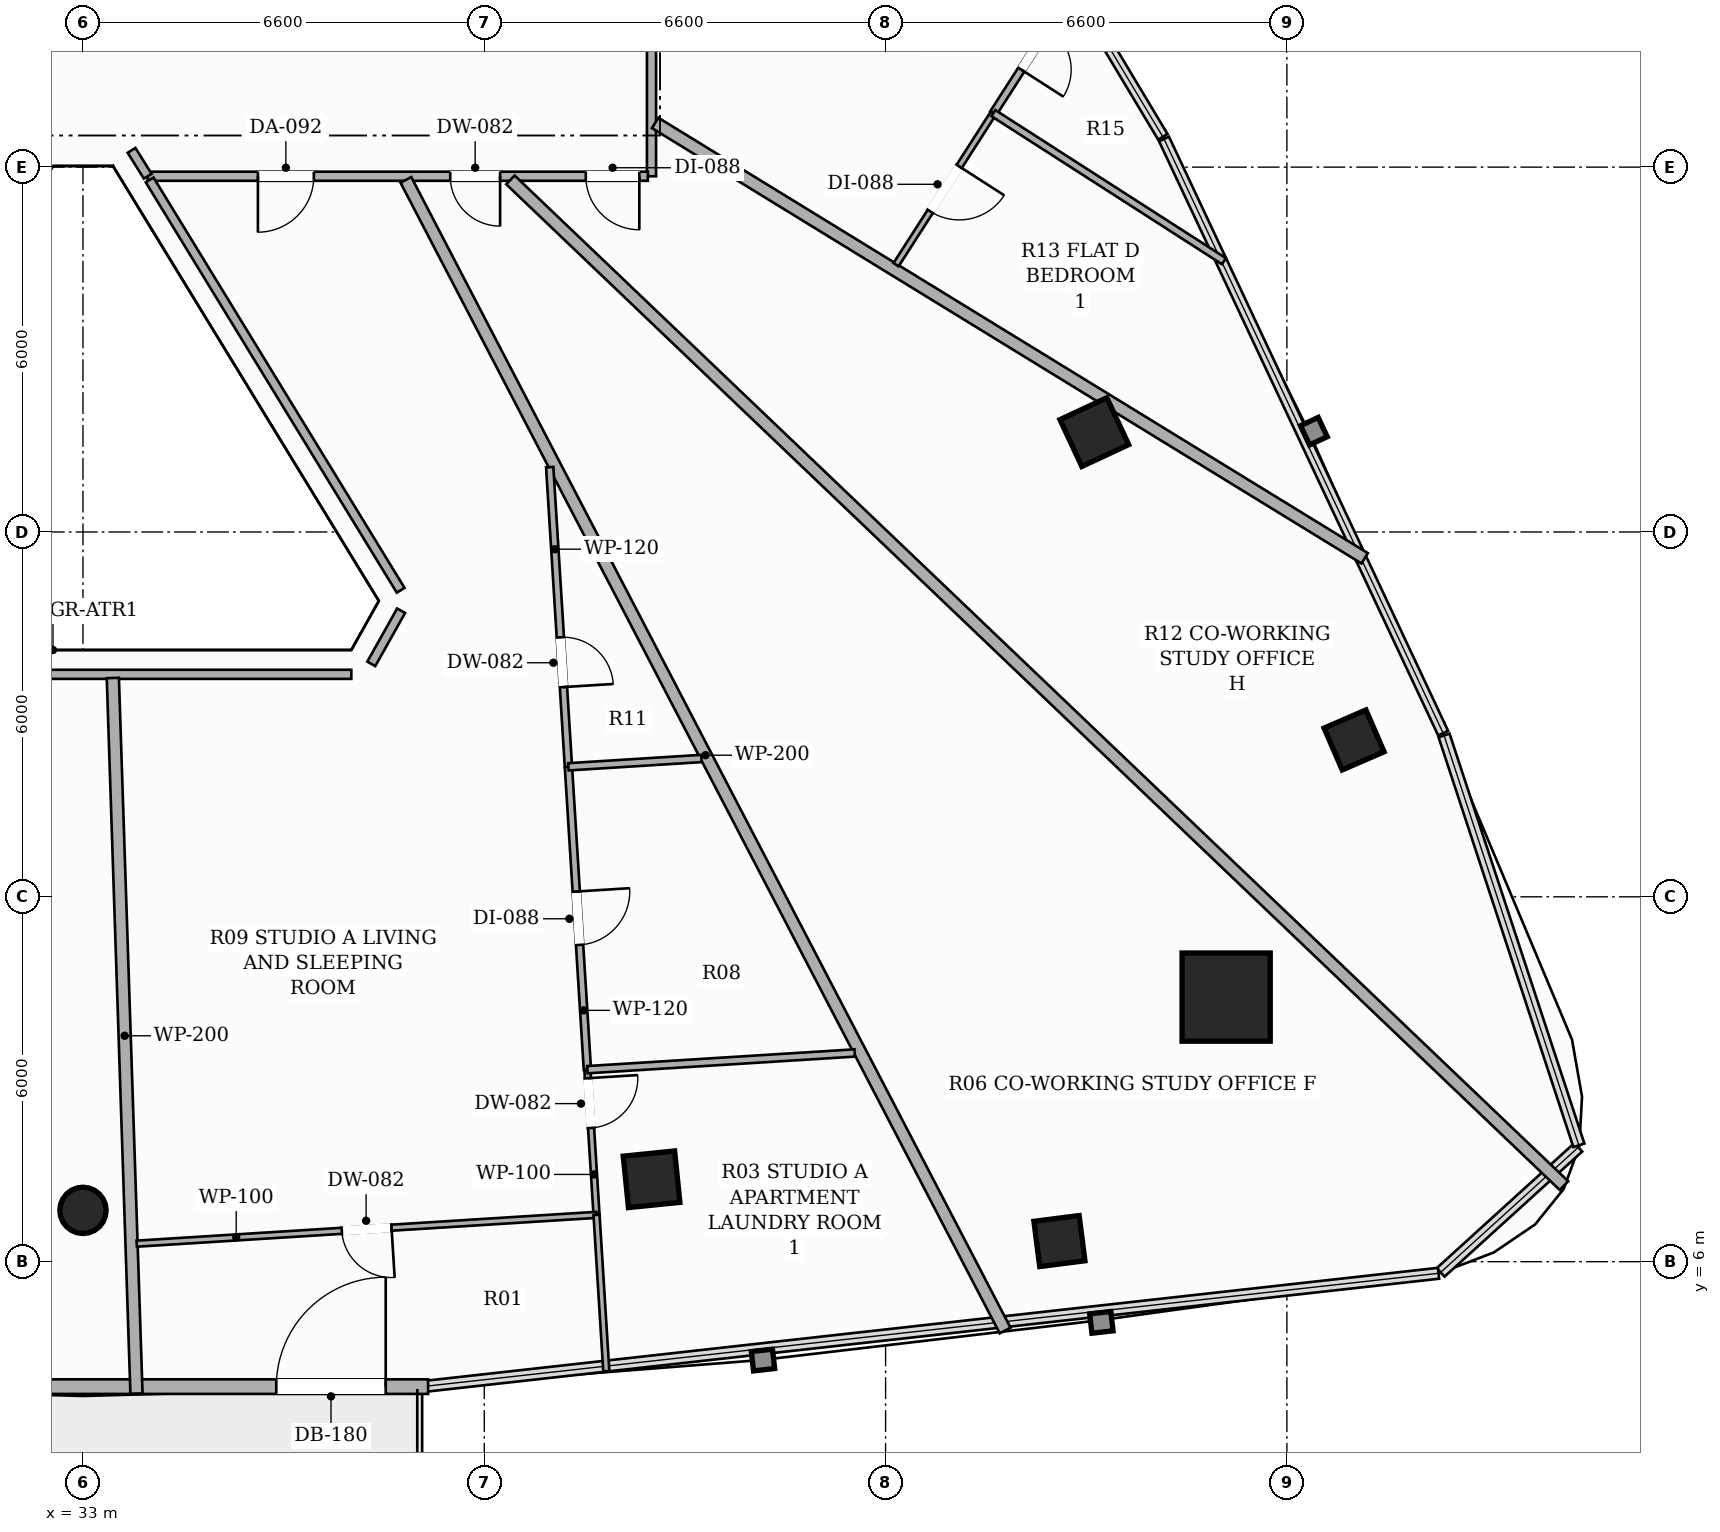
"""IFC4 building model, lengths in metres.
Left out: names, types, materials, properties, quantities, classifications, styles, units other than length and angle.
Written with IfcOpenShell. Run it as: python <this file> out.ifc"""

import sys

from ifc_helpers import new_model, si_unit, direction, frame, frame_2d, origin, origin_2d, place, context, subcontext, project, spatial, rectangle, hollow_rectangle, hollow_circle, extrude, element, fill, save


model = new_model("IFC4")
c1 = context("Model", 3, precision=1e-05, world=origin(), true_north=direction((0.0, 1.0)))
c2 = subcontext(c1, "Body", "Model", "MODEL_VIEW")
j1 = project(units=[si_unit("LENGTHUNIT", "METRE"), si_unit("PLANEANGLEUNIT", "RADIAN")], contexts=[c1])
p1 = place(None, origin())
s1 = spatial("IfcSite", under=j1, at=p1, CompositionType="ELEMENT")
p2 = place(p1, origin())
s2 = spatial("IfcBuilding", under=s1, at=p2, CompositionType="ELEMENT")
p3 = place(p2, frame((0.0, 0.0, 173.75)))
s3 = spatial("IfcBuildingStorey", under=s2, at=p3, CompositionType="ELEMENT", Elevation=173.75)
p4 = place(p3, frame((51.801, 10.351, 0.0), z_axis=(0.0, 0.0, 1.0), x_axis=(1.0, 0.0, 0.0)))
e1 = element("IfcColumn", 1, at=p4, inside=s3, PredefinedType="COLUMN", context=c2, shape_type="SweptSolid", body=[
    extrude(hollow_rectangle(XDim=1.45, YDim=1.45, WallThickness=0.045, at=origin_2d()), origin(), (0.0, 0.0, 1.0), 3.3),
])
p5 = place(p3, frame((33.0, 6.844, 0.0), z_axis=(0.0, 0.0, 1.0), x_axis=(1.0, 0.0, 0.0)))
e2 = element("IfcColumn", 2, at=p5, inside=s3, PredefinedType="COLUMN", context=c2, shape_type="SweptSolid", body=[
    extrude(hollow_circle(Radius=0.381, WallThickness=0.022, at=origin_2d()), origin(), (0.0, 0.0, 1.0), 3.3),
])
for number, where, z_axis, x_axis in (
    (3, (42.351, 7.355, 0.0), (0.0, 0.0, 1.0), (0.995, 0.101, 0.0)),
    (4, (49.633, 19.642, 0.0), (0.0, 0.0, 1.0), (-0.423, 0.906, 0.0)),
):
    element("IfcColumn", number, at=place(p3, frame(where, z_axis=z_axis, x_axis=x_axis)), inside=s3, PredefinedType="COLUMN", context=c2, shape_type="SweptSolid", body=[
        extrude(hollow_rectangle(XDim=0.85, YDim=0.85, WallThickness=0.028, at=origin_2d()), origin(), (0.0, 0.0, 1.0), 3.3),
    ])
for number, where, z_axis, x_axis in (
    (5, (49.059, 6.339, 0.0), (0.0, 0.0, 1.0), (0.992, 0.127, 0.0)),
    (6, (53.905, 14.58, 0.0), (0.0, 0.0, 1.0), (-0.397, 0.918, 0.0)),
):
    element("IfcColumn", number, at=place(p3, frame(where, z_axis=z_axis, x_axis=x_axis)), inside=s3, PredefinedType="COLUMN", context=c2, shape_type="SweptSolid", body=[
        extrude(hollow_rectangle(XDim=0.75, YDim=0.75, WallThickness=0.025, at=origin_2d()), origin(), (0.0, 0.0, 1.0), 3.3),
    ])
p6 = place(p3, frame((27.324, 3.945, 0.0), z_axis=(0.0, 0.0, 1.0), x_axis=(1.0, 0.0, 0.0)))
e7 = element("IfcWall", 7, at=p6, inside=s3, PredefinedType="SOLIDWALL", context=c2, shape_type="SweptSolid", body=[
    extrude(rectangle(XDim=11.352, YDim=0.24, at=frame_2d((5.676, 0.0))), origin(), (0.0, 0.0, 1.0), 2.624),
])
p7 = place(p6, frame((8.855, 0.0, 0.0)))
e8 = element("IfcOpeningElement", 8, at=p7, cuts=e7, PredefinedType="OPENING", context=c2, shape_type="SweptSolid", body=[
    extrude(rectangle(XDim=1.8, YDim=2.2, at=frame_2d((0.9, 1.1))), frame((0.0, 0.13, 0.0), z_axis=(0.0, -1.0, 0.0), x_axis=(1.0, 0.0, 0.0)), (0.0, 0.0, 1.0), 0.26),
])
p8 = place(p3, frame((42.35, 28.34, 0.0), z_axis=(0.0, 0.0, 1.0), x_axis=(0.0, -1.0, 0.0)))
e9 = element("IfcWall", 9, at=p8, inside=s3, PredefinedType="PARTITIONING", context=c2, shape_type="SweptSolid", body=[
    extrude(rectangle(XDim=4.49, YDim=0.15, at=frame_2d((2.245, 0.0))), origin(), (0.0, 0.0, 1.0), 2.721),
])
p9 = place(p8, frame((1.497, 0.0, 0.0)))
e10 = element("IfcOpeningElement", 10, at=p9, cuts=e9, PredefinedType="OPENING", context=c2, shape_type="SweptSolid", body=[
    extrude(rectangle(XDim=0.92, YDim=2.15, at=frame_2d((0.46, 1.075))), frame((0.0, 0.085, 0.0), z_axis=(0.0, -1.0, 0.0), x_axis=(1.0, 0.0, 0.0)), (0.0, 0.0, 1.0), 0.17),
])
p10 = place(p3, frame((42.29, 23.85, 0.0), z_axis=(0.0, 0.0, 1.0), x_axis=(-1.0, 0.0, 0.0)))
e11 = element("IfcWall", 11, at=p10, inside=s3, PredefinedType="PARTITIONING", context=c2, shape_type="SweptSolid", body=[
    extrude(rectangle(XDim=8.225, YDim=0.15, at=frame_2d((4.113, 0.0))), origin(), (0.0, 0.0, 1.0), 2.492),
])
p11 = place(p10, frame((5.493, 0.0, 0.0)))
e12 = element("IfcOpeningElement", 12, at=p11, cuts=e11, PredefinedType="OPENING", context=c2, shape_type="SweptSolid", body=[
    extrude(rectangle(XDim=0.92, YDim=2.15, at=frame_2d((0.46, 1.075))), frame((0.0, 0.085, 0.0), z_axis=(0.0, -1.0, 0.0), x_axis=(1.0, 0.0, 0.0)), (0.0, 0.0, 1.0), 0.17),
])
p12 = place(p10, frame((2.43, 0.0, 0.0)))
e13 = element("IfcOpeningElement", 13, at=p12, cuts=e11, PredefinedType="OPENING", context=c2, shape_type="SweptSolid", body=[
    extrude(rectangle(XDim=0.82, YDim=2.1, at=frame_2d((0.41, 1.05))), frame((0.0, 0.085, 0.0), z_axis=(0.0, -1.0, 0.0), x_axis=(1.0, 0.0, 0.0)), (0.0, 0.0, 1.0), 0.17),
])
p13 = place(p10, frame((0.14, 0.0, 0.0)))
e14 = element("IfcOpeningElement", 14, at=p13, cuts=e11, PredefinedType="OPENING", context=c2, shape_type="SweptSolid", body=[
    extrude(rectangle(XDim=0.88, YDim=2.1, at=frame_2d((0.44, 1.05))), frame((0.0, 0.085, 0.0), z_axis=(0.0, -1.0, 0.0), x_axis=(1.0, 0.0, 0.0)), (0.0, 0.0, 1.0), 0.17),
])
p14 = place(p3, frame((34.065, 23.85, 0.0), z_axis=(0.0, 0.0, 1.0), x_axis=(-0.529649150849, 0.84821682193, 0.0)))
e15 = element("IfcWall", 15, at=p14, inside=s3, PredefinedType="PARTITIONING", context=c2, shape_type="SweptSolid", body=[
    extrude(rectangle(XDim=0.502, YDim=0.15, at=frame_2d((0.251, 0.0))), origin(), (0.0, 0.0, 1.0), 3.06),
])
p15 = place(p3, frame((34.096, 23.79, 0.0), z_axis=(0.0, 0.0, 1.0), x_axis=(0.521886794995, -0.853014755564, 0.0)))
e16 = element("IfcWall", 16, at=p15, inside=s3, PredefinedType="PARTITIONING", context=c2, shape_type="SweptSolid", body=[
    extrude(rectangle(XDim=7.912, YDim=0.15, at=frame_2d((3.956, 0.0))), origin(), (0.0, 0.0, 1.0), 2.721),
])
p16 = place(p3, frame((38.232, 16.705, 0.0), z_axis=(0.0, 0.0, 1.0), x_axis=(-0.489011382175, -0.872277403183, 0.0)))
e17 = element("IfcWall", 17, at=p16, inside=s3, PredefinedType="PARTITIONING", context=c2, shape_type="SweptSolid", body=[
    extrude(rectangle(XDim=1.002, YDim=0.15, at=frame_2d((0.501, 0.0))), origin(), (0.0, 0.0, 1.0), 3.06),
])
p17 = place(p3, frame((37.413, 15.659, 0.0), z_axis=(0.0, 0.0, 1.0), x_axis=(-1.0, 0.0, 0.0)))
e18 = element("IfcWall", 18, at=p17, inside=s3, PredefinedType="PARTITIONING", context=c2, shape_type="SweptSolid", body=[
    extrude(rectangle(XDim=8.826, YDim=0.15, at=frame_2d((4.413, 0.0))), origin(), (0.0, 0.0, 1.0), 2.721),
])
p18 = place(p3, frame((33.88, 3.831, 0.0), z_axis=(0.0, 0.0, 1.0), x_axis=(-0.033030388285, 0.999454347857, 0.0)))
e19 = element("IfcWall", 19, at=p18, inside=s3, PredefinedType="PARTITIONING", context=c2, shape_type="SweptSolid", body=[
    extrude(rectangle(XDim=11.774, YDim=0.2, at=frame_2d((5.887, 0.0))), origin(), (0.0, 0.0, 1.0), 2.413),
])
p19 = place(p3, frame((38.311, 23.79, 0.0), z_axis=(0.0, 0.0, 1.0), x_axis=(0.461923729454, -0.886919651472, 0.0)))
e20 = element("IfcWall", 20, at=p19, inside=s3, PredefinedType="PARTITIONING", context=c2, shape_type="SweptSolid", body=[
    extrude(rectangle(XDim=21.335, YDim=0.2, at=frame_2d((10.667, 0.0))), origin(), (0.0, 0.0, 1.0), 2.413),
])
p20 = place(p3, frame((54.079, 17.567, 0.0), z_axis=(0.0, 0.0, 1.0), x_axis=(-0.852338446262, 0.5229906051, 0.0)))
e21 = element("IfcWall", 21, at=p20, inside=s3, PredefinedType="PARTITIONING", context=c2, shape_type="SweptSolid", body=[
    extrude(rectangle(XDim=13.691, YDim=0.2, at=frame_2d((6.845, 0.0))), origin(), (0.0, 0.0, 1.0), 2.413),
])
p21 = place(p3, frame((40.03, 23.79, 0.0), z_axis=(0.0, 0.0, 1.0), x_axis=(0.723360866179, -0.690470171174, 0.0)))
e22 = element("IfcWall", 22, at=p21, inside=s3, PredefinedType="PARTITIONING", context=c2, shape_type="SweptSolid", body=[
    extrude(rectangle(XDim=23.953, YDim=0.2, at=frame_2d((11.977, 0.0))), origin(), (0.0, 0.0, 1.0), 2.413),
])
p22 = place(p3, frame((40.676, 19.066, 0.0), z_axis=(0.0, 0.0, 1.0), x_axis=(0.062350581346, -0.998054309647, 0.0)))
e23 = element("IfcWall", 23, at=p22, inside=s3, PredefinedType="PARTITIONING", context=c2, shape_type="SweptSolid", body=[
    extrude(rectangle(XDim=4.938, YDim=0.12, at=frame_2d((2.469, 0.0))), origin(), (0.0, 0.0, 1.0), 2.721),
])
p23 = place(p22, frame((2.804, 0.0, 0.0)))
e24 = element("IfcOpeningElement", 24, at=p23, cuts=e23, PredefinedType="OPENING", context=c2, shape_type="SweptSolid", body=[
    extrude(rectangle(XDim=0.82, YDim=2.1, at=frame_2d((0.41, 1.05))), frame((0.0, 0.07, 0.0), z_axis=(0.0, -1.0, 0.0), x_axis=(1.0, 0.0, 0.0)), (0.0, 0.0, 1.0), 0.14),
])
p24 = place(p3, frame((40.984, 14.138, 0.0), z_axis=(0.0, 0.0, 1.0), x_axis=(0.062518380192, -0.998043812735, 0.0)))
e25 = element("IfcWall", 25, at=p24, inside=s3, PredefinedType="PARTITIONING", context=c2, shape_type="SweptSolid", body=[
    extrude(rectangle(XDim=4.991, YDim=0.12, at=frame_2d((2.495, 0.0))), origin(), (0.0, 0.0, 1.0), 2.721),
])
p25 = place(p24, frame((2.055, 0.0, 0.0)))
e26 = element("IfcOpeningElement", 26, at=p25, cuts=e25, PredefinedType="OPENING", context=c2, shape_type="SweptSolid", body=[
    extrude(rectangle(XDim=0.88, YDim=2.1, at=frame_2d((0.44, 1.05))), frame((0.0, 0.07, 0.0), z_axis=(0.0, -1.0, 0.0), x_axis=(1.0, 0.0, 0.0)), (0.0, 0.0, 1.0), 0.14),
])
p26 = place(p3, frame((41.296, 9.157, 0.0), z_axis=(0.0, 0.0, 1.0), x_axis=(0.062778653683, -0.998027474893, 0.0)))
e27 = element("IfcWall", 27, at=p26, inside=s3, PredefinedType="PARTITIONING", context=c2, shape_type="SweptSolid", body=[
    extrude(rectangle(XDim=2.392, YDim=0.1, at=frame_2d((1.196, 0.0))), origin(), (0.0, 0.0, 1.0), 2.413),
])
p27 = place(p26, frame((0.14, 0.0, 0.0)))
e28 = element("IfcOpeningElement", 28, at=p27, cuts=e27, PredefinedType="OPENING", context=c2, shape_type="SweptSolid", body=[
    extrude(rectangle(XDim=0.82, YDim=2.1, at=frame_2d((0.41, 1.05))), frame((0.0, 0.06, 0.0), z_axis=(0.0, -1.0, 0.0), x_axis=(1.0, 0.0, 0.0)), (0.0, 0.0, 1.0), 0.12),
])
p28 = place(p3, frame((41.446, 6.77, 0.0), z_axis=(0.0, 0.0, 1.0), x_axis=(-0.998040272182, -0.062574875979, 0.0)))
e29 = element("IfcWall", 29, at=p28, inside=s3, PredefinedType="PARTITIONING", context=c2, shape_type="SweptSolid", body=[
    extrude(rectangle(XDim=7.577, YDim=0.1, at=frame_2d((3.789, 0.0))), origin(), (0.0, 0.0, 1.0), 3.06),
])
p29 = place(p28, frame((3.378, 0.0, 0.0)))
e30 = element("IfcOpeningElement", 30, at=p29, cuts=e29, PredefinedType="OPENING", context=c2, shape_type="SweptSolid", body=[
    extrude(rectangle(XDim=0.82, YDim=2.1, at=frame_2d((0.41, 1.05))), frame((0.0, 0.06, 0.0), z_axis=(0.0, -1.0, 0.0), x_axis=(1.0, 0.0, 0.0)), (0.0, 0.0, 1.0), 0.12),
])
p30 = place(p3, frame((43.171, 14.275, 0.0), z_axis=(0.0, 0.0, 1.0), x_axis=(-0.998044767373, -0.062503138479, 0.0)))
e31 = element("IfcWall", 31, at=p30, inside=s3, PredefinedType="PARTITIONING", context=c2, shape_type="SweptSolid", body=[
    extrude(rectangle(XDim=2.191, YDim=0.12, at=frame_2d((1.096, 0.0))), origin(), (0.0, 0.0, 1.0), 2.721),
])
p31 = place(p3, frame((45.693, 9.432, 0.0), z_axis=(0.0, 0.0, 1.0), x_axis=(-0.998051500251, -0.062395535466, 0.0)))
e32 = element("IfcWall", 32, at=p31, inside=s3, PredefinedType="PARTITIONING", context=c2, shape_type="SweptSolid", body=[
    extrude(rectangle(XDim=4.406, YDim=0.12, at=frame_2d((2.203, 0.0))), origin(), (0.0, 0.0, 1.0), 2.721),
])
p32 = place(p3, frame((41.607, 4.198, 0.0), z_axis=(0.0, 0.0, 1.0), x_axis=(-0.062431368009, 0.99804925945, 0.0)))
e33 = element("IfcWall", 33, at=p32, inside=s3, PredefinedType="PARTITIONING", context=c2, shape_type="SweptSolid", body=[
    extrude(rectangle(XDim=2.577, YDim=0.1, at=frame_2d((1.289, 0.0))), origin(), (0.0, 0.0, 1.0), 3.06),
])
p33 = place(p3, frame((49.335, 27.008, 0.0), z_axis=(0.0, 0.0, 1.0), x_axis=(-0.540512736599, -0.841335831624, 0.0)))
e34 = element("IfcWall", 34, at=p33, inside=s3, PredefinedType="PARTITIONING", context=c2, shape_type="SweptSolid", body=[
    extrude(rectangle(XDim=2.52, YDim=0.12, at=frame_2d((1.26, 0.0))), origin(), (0.0, 0.0, 1.0), 3.06),
])
p34 = place(p33, frame((0.85, 0.0, 0.0)))
e35 = element("IfcOpeningElement", 35, at=p34, cuts=e34, PredefinedType="OPENING", context=c2, shape_type="SweptSolid", body=[
    extrude(rectangle(XDim=0.82, YDim=2.1, at=frame_2d((0.41, 1.05))), frame((0.0, 0.07, 0.0), z_axis=(0.0, -1.0, 0.0), x_axis=(1.0, 0.0, 0.0)), (0.0, 0.0, 1.0), 0.14),
])
p35 = place(p3, frame((47.973, 24.888, 0.0), z_axis=(0.0, 0.0, 1.0), x_axis=(-0.54033686579, -0.841448793135, 0.0)))
e36 = element("IfcWall", 36, at=p35, inside=s3, PredefinedType="PARTITIONING", context=c2, shape_type="SweptSolid", body=[
    extrude(rectangle(XDim=2.963, YDim=0.1, at=frame_2d((1.481, 0.0))), origin(), (0.0, 0.0, 1.0), 2.413),
])
p36 = place(p35, frame((1.041, 0.0, 0.0)))
e37 = element("IfcOpeningElement", 37, at=p36, cuts=e36, PredefinedType="OPENING", context=c2, shape_type="SweptSolid", body=[
    extrude(rectangle(XDim=0.88, YDim=2.1, at=frame_2d((0.44, 1.05))), frame((0.0, 0.06, 0.0), z_axis=(0.0, -1.0, 0.0), x_axis=(1.0, 0.0, 0.0)), (0.0, 0.0, 1.0), 0.12),
])
p37 = place(p3, frame((51.765, 22.453, 0.0), z_axis=(0.0, 0.0, 1.0), x_axis=(-0.841445922542, 0.540341336044, 0.0)))
e38 = element("IfcWall", 38, at=p37, inside=s3, PredefinedType="PARTITIONING", context=c2, shape_type="SweptSolid", body=[
    extrude(rectangle(XDim=4.507, YDim=0.12, at=frame_2d((2.253, 0.0))), origin(), (0.0, 0.0, 1.0), 3.06),
])
p38 = place(p7, origin())
e39 = element("IfcDoor", 39, at=p38, inside=s3, OperationType="SINGLE_SWING_RIGHT", PredefinedType="DOOR", context=c2, shape_type="SweptSolid", body=[
    extrude(rectangle(XDim=1.8, YDim=2.2, at=frame_2d((0.9, 1.1))), frame((0.0, 0.025, 0.0), z_axis=(0.0, -1.0, 0.0), x_axis=(1.0, 0.0, 0.0)), (0.0, 0.0, 1.0), 0.05),
])
fill(e8, e39)
p39 = place(p11, origin())
e40 = element("IfcDoor", 40, at=p39, inside=s3, OperationType="SINGLE_SWING_RIGHT", PredefinedType="DOOR", context=c2, shape_type="SweptSolid", body=[
    extrude(rectangle(XDim=0.92, YDim=2.15, at=frame_2d((0.46, 1.075))), frame((0.0, 0.025, 0.0), z_axis=(0.0, -1.0, 0.0), x_axis=(1.0, 0.0, 0.0)), (0.0, 0.0, 1.0), 0.05),
])
fill(e12, e40)
p40 = place(p23, origin())
e41 = element("IfcDoor", 41, at=p40, inside=s3, OperationType="SINGLE_SWING_RIGHT", PredefinedType="DOOR", context=c2, shape_type="SweptSolid", body=[
    extrude(rectangle(XDim=0.82, YDim=2.1, at=frame_2d((0.41, 1.05))), frame((0.0, 0.025, 0.0), z_axis=(0.0, -1.0, 0.0), x_axis=(1.0, 0.0, 0.0)), (0.0, 0.0, 1.0), 0.05),
])
fill(e24, e41)
p41 = place(p25, origin())
e42 = element("IfcDoor", 42, at=p41, inside=s3, OperationType="SINGLE_SWING_LEFT", PredefinedType="DOOR", context=c2, shape_type="SweptSolid", body=[
    extrude(rectangle(XDim=0.88, YDim=2.1, at=frame_2d((0.44, 1.05))), frame((0.0, 0.025, 0.0), z_axis=(0.0, -1.0, 0.0), x_axis=(1.0, 0.0, 0.0)), (0.0, 0.0, 1.0), 0.05),
])
fill(e26, e42)
p42 = place(p27, origin())
e43 = element("IfcDoor", 43, at=p42, inside=s3, OperationType="SINGLE_SWING_LEFT", PredefinedType="DOOR", context=c2, shape_type="SweptSolid", body=[
    extrude(rectangle(XDim=0.82, YDim=2.1, at=frame_2d((0.41, 1.05))), frame((0.0, 0.025, 0.0), z_axis=(0.0, -1.0, 0.0), x_axis=(1.0, 0.0, 0.0)), (0.0, 0.0, 1.0), 0.05),
])
fill(e28, e43)
p43 = place(p29, origin())
e44 = element("IfcDoor", 44, at=p43, inside=s3, OperationType="SINGLE_SWING_LEFT", PredefinedType="DOOR", context=c2, shape_type="SweptSolid", body=[
    extrude(rectangle(XDim=0.82, YDim=2.1, at=frame_2d((0.41, 1.05))), frame((0.0, 0.025, 0.0), z_axis=(0.0, -1.0, 0.0), x_axis=(1.0, 0.0, 0.0)), (0.0, 0.0, 1.0), 0.05),
])
fill(e30, e44)
p44 = place(p34, origin())
e45 = element("IfcDoor", 45, at=p44, inside=s3, OperationType="SINGLE_SWING_RIGHT", PredefinedType="DOOR", context=c2, shape_type="SweptSolid", body=[
    extrude(rectangle(XDim=0.82, YDim=2.1, at=frame_2d((0.41, 1.05))), frame((0.0, 0.025, 0.0), z_axis=(0.0, -1.0, 0.0), x_axis=(1.0, 0.0, 0.0)), (0.0, 0.0, 1.0), 0.05),
])
fill(e35, e45)
p45 = place(p36, origin())
e46 = element("IfcDoor", 46, at=p45, inside=s3, OperationType="SINGLE_SWING_LEFT", PredefinedType="DOOR", context=c2, shape_type="SweptSolid", body=[
    extrude(rectangle(XDim=0.88, YDim=2.1, at=frame_2d((0.44, 1.05))), frame((0.0, 0.025, 0.0), z_axis=(0.0, -1.0, 0.0), x_axis=(1.0, 0.0, 0.0)), (0.0, 0.0, 1.0), 0.05),
])
fill(e37, e46)
p46 = place(p12, origin())
e47 = element("IfcDoor", 47, at=p46, inside=s3, OperationType="SINGLE_SWING_LEFT", PredefinedType="DOOR", context=c2, shape_type="SweptSolid", body=[
    extrude(rectangle(XDim=0.82, YDim=2.1, at=frame_2d((0.41, 1.05))), frame((0.0, 0.025, 0.0), z_axis=(0.0, -1.0, 0.0), x_axis=(1.0, 0.0, 0.0)), (0.0, 0.0, 1.0), 0.05),
])
fill(e13, e47)
p47 = place(p13, origin())
e48 = element("IfcDoor", 48, at=p47, inside=s3, OperationType="SINGLE_SWING_LEFT", PredefinedType="DOOR", context=c2, shape_type="SweptSolid", body=[
    extrude(rectangle(XDim=0.88, YDim=2.1, at=frame_2d((0.44, 1.05))), frame((0.0, 0.025, 0.0), z_axis=(0.0, -1.0, 0.0), x_axis=(1.0, 0.0, 0.0)), (0.0, 0.0, 1.0), 0.05),
])
fill(e14, e48)
save(model, sys.argv[1])
